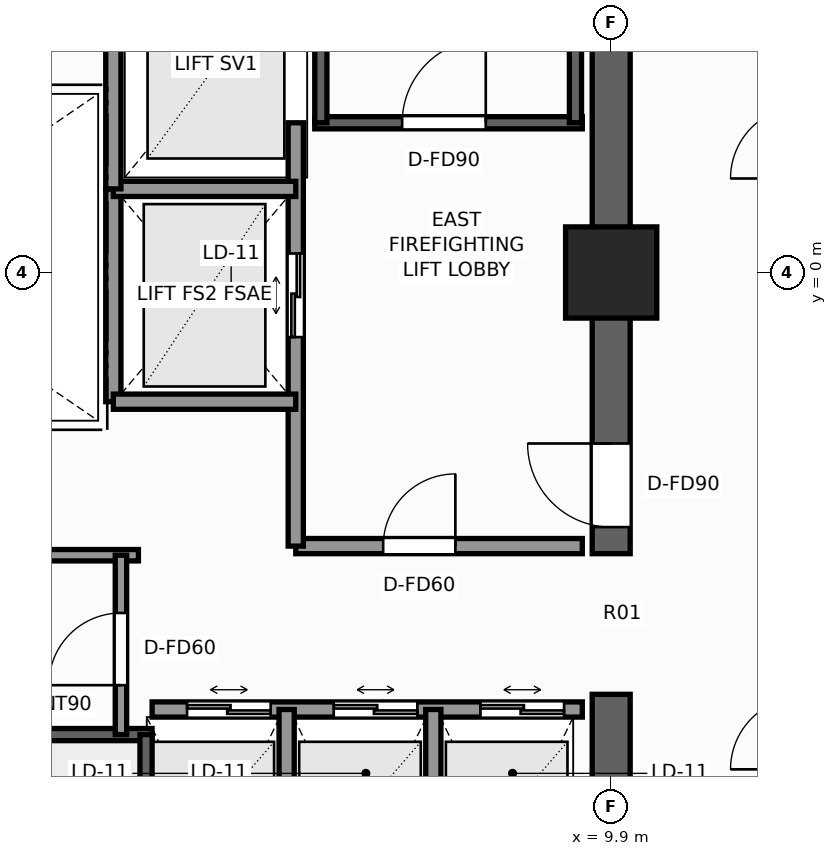
"""IFC4 building model, lengths in metres.
Left out: names, types, materials, properties, quantities, classifications, styles, units other than length and angle.
Written with IfcOpenShell. Run it as: python <this file> out.ifc"""

import sys

from ifc_helpers import new_model, si_unit, direction, frame, frame_2d, origin, origin_2d, place, context, subcontext, project, spatial, rectangle, extrude, element, fill, save


model = new_model("IFC4")
c1 = context("Model", 3, precision=1e-05, world=origin(), true_north=direction((0.0, 1.0)))
c2 = subcontext(c1, "Body", "Model", "MODEL_VIEW")
j1 = project(units=[si_unit("LENGTHUNIT", "METRE"), si_unit("PLANEANGLEUNIT", "RADIAN")], contexts=[c1])
p1 = place(None, origin())
s1 = spatial("IfcSite", under=j1, at=p1, CompositionType="ELEMENT")
p2 = place(p1, origin())
s2 = spatial("IfcBuilding", under=s1, at=p2, CompositionType="ELEMENT")
p3 = place(p2, frame((0.0, 0.0, 170.1)))
s3 = spatial("IfcBuildingStorey", under=s2, at=p3, CompositionType="ELEMENT", Elevation=170.1)
p4 = place(p3, frame((9.9, -9.65, 0.0), z_axis=(0.0, 0.0, 1.0), x_axis=(0.0, 1.0, 0.0)))
e1 = element("IfcWall", 1, at=p4, inside=s3, PredefinedType="SHEAR", context=c2, shape_type="SweptSolid", body=[
    extrude(rectangle(XDim=4.1, YDim=0.5, at=frame_2d((2.05, 0.0))), origin(), (0.0, 0.0, 1.0), 3.3),
])
p5 = place(p3, frame((9.9, -3.7, 0.0), z_axis=(0.0, 0.0, 1.0), x_axis=(0.0, 1.0, 0.0)))
e2 = element("IfcWall", 2, at=p5, inside=s3, PredefinedType="SHEAR", context=c2, shape_type="SweptSolid", body=[
    extrude(rectangle(XDim=13.35, YDim=0.5, at=frame_2d((6.675, 0.0))), origin(), (0.0, 0.0, 1.0), 3.3),
])
p6 = place(p5, frame((0.35, 0.0, 0.0)))
e3 = element("IfcOpeningElement", 3, at=p6, cuts=e2, PredefinedType="OPENING", context=c2, shape_type="SweptSolid", body=[
    extrude(rectangle(XDim=1.1, YDim=2.2, at=frame_2d((0.55, 1.1))), frame((0.0, 0.26, 0.0), z_axis=(0.0, -1.0, 0.0), x_axis=(1.0, 0.0, 0.0)), (0.0, 0.0, 1.0), 0.52),
])
p7 = place(p3, frame((9.9, 0.0, 0.0), z_axis=(0.0, 0.0, 1.0), x_axis=(1.0, 0.0, 0.0)))
e4 = element("IfcColumn", 4, at=p7, inside=s3, PredefinedType="COLUMN", context=c2, shape_type="SweptSolid", body=[
    extrude(rectangle(XDim=1.2, YDim=1.2, at=origin_2d()), origin(), (0.0, 0.0, 1.0), 3.3),
])
p8 = place(p3, frame((6.0, 1.97, 0.0), z_axis=(0.0, 0.0, 1.0), x_axis=(1.0, 0.0, 0.0)))
e5 = element("IfcWall", 5, at=p8, inside=s3, PredefinedType="SHEAR", context=c2, shape_type="SweptSolid", body=[
    extrude(rectangle(XDim=3.52, YDim=0.16, at=frame_2d((1.76, 0.0))), origin(), (0.0, 0.0, 1.0), 3.3),
])
p9 = place(p8, frame((1.15, 0.0, 0.0)))
e6 = element("IfcOpeningElement", 6, at=p9, cuts=e5, PredefinedType="OPENING", context=c2, shape_type="SweptSolid", body=[
    extrude(rectangle(XDim=1.1, YDim=2.2, at=frame_2d((0.55, 1.1))), frame((0.0, 0.09, 0.0), z_axis=(0.0, -1.0, 0.0), x_axis=(1.0, 0.0, 0.0)), (0.0, 0.0, 1.0), 0.18),
])
for number, where, z_axis, x_axis in (
    (7, (6.08, 1.97, 0.0), (0.0, 0.0, 1.0), (0.0, 1.0, 0.0)),
    (8, (9.43, 1.97, 0.0), (0.0, 0.0, 1.0), (0.0, 1.0, 0.0)),
):
    element("IfcWall", number, at=place(p3, frame(where, z_axis=z_axis, x_axis=x_axis)), inside=s3, PredefinedType="SHEAR", context=c2, shape_type="SweptSolid", body=[
        extrude(rectangle(XDim=7.56, YDim=0.16, at=frame_2d((3.78, 0.0))), origin(), (0.0, 0.0, 1.0), 3.3),
    ])
p10 = place(p3, frame((-3.86, -6.08, 0.0), z_axis=(0.0, 0.0, 1.0), x_axis=(1.0, 0.0, 0.0)))
e9 = element("IfcWall", 9, at=p10, inside=s3, PredefinedType="SHEAR", context=c2, shape_type="SweptSolid", body=[
    extrude(rectangle(XDim=7.72, YDim=0.16, at=frame_2d((3.86, 0.0))), origin(), (0.0, 0.0, 1.0), 3.3),
])
p11 = place(p3, frame((3.78, -9.43, 0.0), z_axis=(0.0, 0.0, 1.0), x_axis=(0.0, 1.0, 0.0)))
e10 = element("IfcWall", 10, at=p11, inside=s3, PredefinedType="SHEAR", context=c2, shape_type="SweptSolid", body=[
    extrude(rectangle(XDim=3.35, YDim=0.16, at=frame_2d((1.675, 0.0))), origin(), (0.0, 0.0, 1.0), 3.3),
])
p12 = place(p3, frame((5.75, -3.6, 0.0), z_axis=(0.0, 0.0, 1.0), x_axis=(1.0, 0.0, 0.0)))
e11 = element("IfcWall", 11, at=p12, inside=s3, PredefinedType="SOLIDWALL", context=c2, shape_type="SweptSolid", body=[
    extrude(rectangle(XDim=3.77, YDim=0.2, at=frame_2d((1.885, 0.0))), origin(), (0.0, 0.0, 1.0), 3.08),
])
p13 = place(p12, frame((1.15, 0.0, 0.0)))
e12 = element("IfcOpeningElement", 12, at=p13, cuts=e11, PredefinedType="OPENING", context=c2, shape_type="SweptSolid", body=[
    extrude(rectangle(XDim=0.95, YDim=2.06, at=frame_2d((0.475, 1.03))), frame((0.0, 0.11, 0.0), z_axis=(0.0, -1.0, 0.0), x_axis=(1.0, 0.0, 0.0)), (0.0, 0.0, 1.0), 0.22),
])
p14 = place(p3, frame((5.75, -3.6, 0.0), z_axis=(0.0, 0.0, 1.0), x_axis=(0.0, 1.0, 0.0)))
e13 = element("IfcWall", 13, at=p14, inside=s3, PredefinedType="SOLIDWALL", context=c2, shape_type="SweptSolid", body=[
    extrude(rectangle(XDim=5.57, YDim=0.2, at=frame_2d((2.785, 0.0))), origin(), (0.0, 0.0, 1.0), 2.715),
])
p15 = place(p14, frame((2.75, 0.0, 0.0)))
e14 = element("IfcOpeningElement", 14, at=p15, cuts=e13, PredefinedType="OPENING", context=c2, shape_type="SweptSolid", body=[
    extrude(rectangle(XDim=1.1, YDim=2.2, at=frame_2d((0.55, 1.1))), frame((0.0, 0.11, 0.0), z_axis=(0.0, -1.0, 0.0), x_axis=(1.0, 0.0, 0.0)), (0.0, 0.0, 1.0), 0.22),
])
p16 = place(p3, frame((3.35, -1.7, 0.0), z_axis=(0.0, 0.0, 1.0), x_axis=(0.0, 1.0, 0.0)))
e15 = element("IfcWall", 15, at=p16, inside=s3, PredefinedType="SOLIDWALL", context=c2, shape_type="SweptSolid", body=[
    extrude(rectangle(XDim=2.8, YDim=0.2, at=frame_2d((1.4, 0.0))), origin(), (0.0, 0.0, 1.0), 2.715),
])
for number, where, z_axis, x_axis in (
    (16, (3.35, -1.7, 0.0), (0.0, 0.0, 1.0), (1.0, 0.0, 0.0)),
    (17, (3.35, 1.1, 0.0), (0.0, 0.0, 1.0), (1.0, 0.0, 0.0)),
):
    element("IfcWall", number, at=place(p3, frame(where, z_axis=z_axis, x_axis=x_axis)), inside=s3, PredefinedType="SOLIDWALL", context=c2, shape_type="SweptSolid", body=[
        extrude(rectangle(XDim=2.4, YDim=0.2, at=frame_2d((1.2, 0.0))), origin(), (0.0, 0.0, 1.0), 3.08),
    ])
p17 = place(p3, frame((3.35, 1.1, 0.0), z_axis=(0.0, 0.0, 1.0), x_axis=(0.0, 1.0, 0.0)))
e18 = element("IfcWall", 18, at=p17, inside=s3, PredefinedType="SOLIDWALL", context=c2, shape_type="SweptSolid", body=[
    extrude(rectangle(XDim=3.2, YDim=0.2, at=frame_2d((1.6, 0.0))), origin(), (0.0, 0.0, 1.0), 2.715),
])
p18 = place(p3, frame((3.86, -5.75, 0.0), z_axis=(0.0, 0.0, 1.0), x_axis=(1.0, 0.0, 0.0)))
e19 = element("IfcWall", 19, at=p18, inside=s3, PredefinedType="SOLIDWALL", context=c2, shape_type="SweptSolid", body=[
    extrude(rectangle(XDim=5.66, YDim=0.2, at=frame_2d((2.83, 0.0))), origin(), (0.0, 0.0, 1.0), 3.08),
])
p19 = place(p18, frame((0.46, 0.0, 0.0)))
e20 = element("IfcOpeningElement", 20, at=p19, cuts=e19, PredefinedType="OPENING", context=c2, shape_type="SweptSolid", body=[
    extrude(rectangle(XDim=1.1, YDim=2.2, at=frame_2d((0.55, 1.1))), frame((0.0, 0.11, 0.0), z_axis=(0.0, -1.0, 0.0), x_axis=(1.0, 0.0, 0.0)), (0.0, 0.0, 1.0), 0.22),
])
p20 = place(p18, frame((2.39, 0.0, 0.0)))
e21 = element("IfcOpeningElement", 21, at=p20, cuts=e19, PredefinedType="OPENING", context=c2, shape_type="SweptSolid", body=[
    extrude(rectangle(XDim=1.1, YDim=2.2, at=frame_2d((0.55, 1.1))), frame((0.0, 0.11, 0.0), z_axis=(0.0, -1.0, 0.0), x_axis=(1.0, 0.0, 0.0)), (0.0, 0.0, 1.0), 0.22),
])
p21 = place(p18, frame((4.32, 0.0, 0.0)))
e22 = element("IfcOpeningElement", 22, at=p21, cuts=e19, PredefinedType="OPENING", context=c2, shape_type="SweptSolid", body=[
    extrude(rectangle(XDim=1.1, YDim=2.2, at=frame_2d((0.55, 1.1))), frame((0.0, 0.11, 0.0), z_axis=(0.0, -1.0, 0.0), x_axis=(1.0, 0.0, 0.0)), (0.0, 0.0, 1.0), 0.22),
])
for number, where, z_axis, x_axis in (
    (23, (5.63, -9.52, 0.0), (0.0, 0.0, 1.0), (0.0, 1.0, 0.0)),
    (24, (7.56, -9.52, 0.0), (0.0, 0.0, 1.0), (0.0, 1.0, 0.0)),
):
    element("IfcWall", number, at=place(p3, frame(where, z_axis=z_axis, x_axis=x_axis)), inside=s3, PredefinedType="SOLIDWALL", context=c2, shape_type="SweptSolid", body=[
        extrude(rectangle(XDim=3.77, YDim=0.2, at=frame_2d((1.885, 0.0))), origin(), (0.0, 0.0, 1.0), 3.08),
    ])
p22 = place(p3, frame((-3.68, -3.72, 0.0), z_axis=(0.0, 0.0, 1.0), x_axis=(1.0, 0.0, 0.0)))
e25 = element("IfcWall", 25, at=p22, inside=s3, PredefinedType="PARTITIONING", context=c2, shape_type="SweptSolid", body=[
    extrude(rectangle(XDim=7.36, YDim=0.15, at=frame_2d((3.68, 0.0))), origin(), (0.0, 0.0, 1.0), 3.08),
])
p23 = place(p3, frame((3.45, -6.08, 0.0), z_axis=(0.0, 0.0, 1.0), x_axis=(0.0, 1.0, 0.0)))
e26 = element("IfcWall", 26, at=p23, inside=s3, PredefinedType="PARTITIONING", context=c2, shape_type="SweptSolid", body=[
    extrude(rectangle(XDim=2.36, YDim=0.15, at=frame_2d((1.18, 0.0))), origin(), (0.0, 0.0, 1.0), 3.08),
])
p24 = place(p23, frame((0.65, 0.0, 0.0)))
e27 = element("IfcOpeningElement", 27, at=p24, cuts=e26, PredefinedType="OPENING", context=c2, shape_type="SweptSolid", body=[
    extrude(rectangle(XDim=0.95, YDim=2.06, at=frame_2d((0.475, 1.03))), frame((0.0, 0.085, 0.0), z_axis=(0.0, -1.0, 0.0), x_axis=(1.0, 0.0, 0.0)), (0.0, 0.0, 1.0), 0.17),
])
p25 = place(p9, origin())
e28 = element("IfcDoor", 28, at=p25, inside=s3, OperationType="SINGLE_SWING_RIGHT", PredefinedType="DOOR", context=c2, shape_type="SweptSolid", body=[
    extrude(rectangle(XDim=1.1, YDim=2.2, at=frame_2d((0.55, 1.1))), frame((0.0, 0.025, 0.0), z_axis=(0.0, -1.0, 0.0), x_axis=(1.0, 0.0, 0.0)), (0.0, 0.0, 1.0), 0.05),
])
fill(e6, e28)
p26 = place(p6, origin())
e29 = element("IfcDoor", 29, at=p26, inside=s3, OperationType="SINGLE_SWING_RIGHT", PredefinedType="DOOR", context=c2, shape_type="SweptSolid", body=[
    extrude(rectangle(XDim=1.1, YDim=2.2, at=frame_2d((0.55, 1.1))), frame((0.0, 0.025, 0.0), z_axis=(0.0, -1.0, 0.0), x_axis=(1.0, 0.0, 0.0)), (0.0, 0.0, 1.0), 0.05),
])
fill(e3, e29)
p27 = place(p15, origin())
e30 = element("IfcDoor", 30, at=p27, inside=s3, OperationType="DOUBLE_DOOR_SLIDING", PredefinedType="DOOR", context=c2, shape_type="SweptSolid", body=[
    extrude(rectangle(XDim=1.1, YDim=2.2, at=frame_2d((0.55, 1.1))), frame((0.0, 0.025, 0.0), z_axis=(0.0, -1.0, 0.0), x_axis=(1.0, 0.0, 0.0)), (0.0, 0.0, 1.0), 0.05),
])
fill(e14, e30)
p28 = place(p19, origin())
e31 = element("IfcDoor", 31, at=p28, inside=s3, OperationType="DOUBLE_DOOR_SLIDING", PredefinedType="DOOR", context=c2, shape_type="SweptSolid", body=[
    extrude(rectangle(XDim=1.1, YDim=2.2, at=frame_2d((0.55, 1.1))), frame((0.0, 0.025, 0.0), z_axis=(0.0, -1.0, 0.0), x_axis=(1.0, 0.0, 0.0)), (0.0, 0.0, 1.0), 0.05),
])
fill(e20, e31)
p29 = place(p20, origin())
e32 = element("IfcDoor", 32, at=p29, inside=s3, OperationType="DOUBLE_DOOR_SLIDING", PredefinedType="DOOR", context=c2, shape_type="SweptSolid", body=[
    extrude(rectangle(XDim=1.1, YDim=2.2, at=frame_2d((0.55, 1.1))), frame((0.0, 0.025, 0.0), z_axis=(0.0, -1.0, 0.0), x_axis=(1.0, 0.0, 0.0)), (0.0, 0.0, 1.0), 0.05),
])
fill(e21, e32)
p30 = place(p21, origin())
e33 = element("IfcDoor", 33, at=p30, inside=s3, OperationType="DOUBLE_DOOR_SLIDING", PredefinedType="DOOR", context=c2, shape_type="SweptSolid", body=[
    extrude(rectangle(XDim=1.1, YDim=2.2, at=frame_2d((0.55, 1.1))), frame((0.0, 0.025, 0.0), z_axis=(0.0, -1.0, 0.0), x_axis=(1.0, 0.0, 0.0)), (0.0, 0.0, 1.0), 0.05),
])
fill(e22, e33)
p31 = place(p13, origin())
e34 = element("IfcDoor", 34, at=p31, inside=s3, OperationType="SINGLE_SWING_RIGHT", PredefinedType="DOOR", context=c2, shape_type="SweptSolid", body=[
    extrude(rectangle(XDim=0.95, YDim=2.06, at=frame_2d((0.475, 1.03))), frame((0.0, 0.025, 0.0), z_axis=(0.0, -1.0, 0.0), x_axis=(1.0, 0.0, 0.0)), (0.0, 0.0, 1.0), 0.05),
])
fill(e12, e34)
p32 = place(p24, origin())
e35 = element("IfcDoor", 35, at=p32, inside=s3, OperationType="SINGLE_SWING_LEFT", PredefinedType="DOOR", context=c2, shape_type="SweptSolid", body=[
    extrude(rectangle(XDim=0.95, YDim=2.06, at=frame_2d((0.475, 1.03))), frame((0.0, 0.025, 0.0), z_axis=(0.0, -1.0, 0.0), x_axis=(1.0, 0.0, 0.0)), (0.0, 0.0, 1.0), 0.05),
])
fill(e27, e35)
save(model, sys.argv[1])
